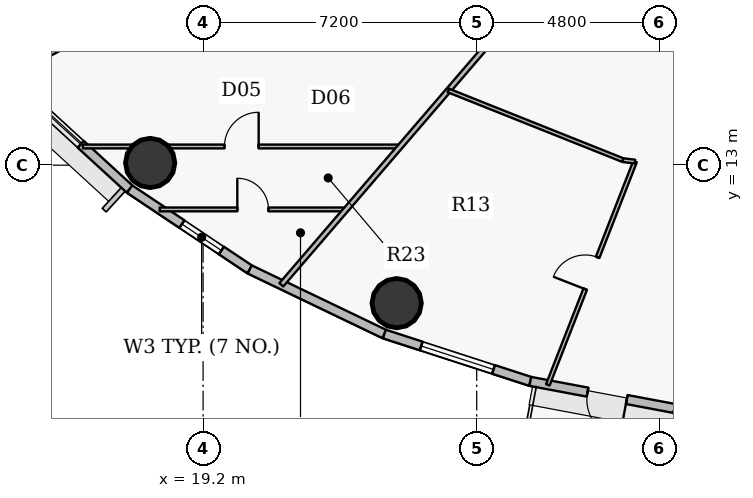
"""IFC4 building model, lengths in metres.
Left out: names, types, materials, properties, quantities, classifications, styles, units other than length and angle.
Written with IfcOpenShell. Run it as: python <this file> out.ifc"""

import sys

from ifc_helpers import new_model, si_unit, direction, frame, frame_2d, origin, origin_2d, place, context, subcontext, project, spatial, rectangle, hollow_circle, extrude, source, transform, mapped, element, fill, save


model = new_model("IFC4")
c1 = context("Model", 3, precision=1e-05, world=origin(), true_north=direction((0.0, 1.0)))
c2 = subcontext(c1, "Body", "Model", "MODEL_VIEW")
j1 = project(units=[si_unit("LENGTHUNIT", "METRE"), si_unit("PLANEANGLEUNIT", "RADIAN")], contexts=[c1])
p1 = place(None, origin())
s1 = spatial("IfcSite", under=j1, at=p1, CompositionType="ELEMENT")
p2 = place(p1, origin())
s2 = spatial("IfcBuilding", under=s1, at=p2, CompositionType="ELEMENT")
p3 = place(p2, frame((0.0, 0.0, 182.4)))
s3 = spatial("IfcBuildingStorey", under=s2, at=p3, CompositionType="ELEMENT", Elevation=182.4)
for number, where, z_axis, x_axis in (
    (1, (17.808, 13.058, 0.0), (0.0, 0.0, 1.0), (1.0, 0.0, 0.0)),
    (2, (24.294, 9.369, 0.0), (0.0, 0.0, 1.0), (1.0, 0.0, 0.0)),
):
    element("IfcColumn", number, at=place(p3, frame(where, z_axis=z_axis, x_axis=x_axis)), inside=s3, PredefinedType="COLUMN", context=c2, shape_type="SweptSolid", body=[
        extrude(hollow_circle(Radius=0.65, WallThickness=0.04, at=origin_2d()), origin(), (0.0, 0.0, 1.0), 3.75),
    ])
p4 = place(p3, frame((17.268, 12.369, 0.0), z_axis=(0.0, 0.0, 1.0), x_axis=(-0.737076565834, 0.675809245349, 0.0)))
e3 = element("IfcWall", 3, at=p4, inside=s3, PredefinedType="SOLIDWALL", context=c2, shape_type="SweptSolid", body=[
    extrude(rectangle(XDim=3.658, YDim=0.24, at=frame_2d((1.829, 0.0))), origin(), (0.0, 0.0, 1.0), 3.5),
])
p5 = place(p4, frame((1.746, 0.0, 0.9)))
e4 = element("IfcOpeningElement", 4, at=p5, cuts=e3, PredefinedType="OPENING", context=c2, shape_type="SweptSolid", body=[
    extrude(rectangle(XDim=1.25, YDim=1.65, at=origin_2d()), frame((0.625, 0.13, 0.825), z_axis=(0.0, -1.0, 0.0), x_axis=(1.0, 0.0, 0.0)), (0.0, 0.0, 1.0), 0.26),
])
p6 = place(p3, frame((20.427, 10.257, 0.0), z_axis=(0.0, 0.0, 1.0), x_axis=(-0.831228998277, 0.555930168657, 0.0)))
e5 = element("IfcWall", 5, at=p6, inside=s3, PredefinedType="SOLIDWALL", context=c2, shape_type="SweptSolid", body=[
    extrude(rectangle(XDim=3.8, YDim=0.24, at=frame_2d((1.9, 0.0))), origin(), (0.0, 0.0, 1.0), 3.5),
])
p7 = place(p6, frame((0.896, 0.0, 0.9)))
e6 = element("IfcOpeningElement", 6, at=p7, cuts=e5, PredefinedType="OPENING", context=c2, shape_type="SweptSolid", body=[
    extrude(rectangle(XDim=1.25, YDim=1.65, at=origin_2d()), frame((0.625, 0.13, 0.825), z_axis=(0.0, -1.0, 0.0), x_axis=(1.0, 0.0, 0.0)), (0.0, 0.0, 1.0), 0.26),
])
p8 = place(p3, frame((23.97, 8.556, 0.0), z_axis=(0.0, 0.0, 1.0), x_axis=(-0.901564733809, 0.432644231155, 0.0)))
e7 = element("IfcWall", 7, at=p8, inside=s3, PredefinedType="SOLIDWALL", context=c2, shape_type="SweptSolid", body=[
    extrude(rectangle(XDim=3.93, YDim=0.24, at=frame_2d((1.965, 0.0))), origin(), (0.0, 0.0, 1.0), 3.5),
])
p9 = place(p3, frame((27.811, 7.311, 0.0), z_axis=(0.0, 0.0, 1.0), x_axis=(-0.951209870236, 0.30854462038, 0.0)))
e8 = element("IfcWall", 8, at=p9, inside=s3, PredefinedType="SOLIDWALL", context=c2, shape_type="SweptSolid", body=[
    extrude(rectangle(XDim=4.038, YDim=0.24, at=frame_2d((2.019, 0.0))), origin(), (0.0, 0.0, 1.0), 3.5),
])
p10 = place(p9, frame((1.019, 0.0, 0.9)))
e9 = element("IfcOpeningElement", 9, at=p10, cuts=e8, PredefinedType="OPENING", context=c2, shape_type="SweptSolid", body=[
    extrude(rectangle(XDim=2.0, YDim=1.75, at=origin_2d()), frame((1.0, 0.13, 0.875), z_axis=(0.0, -1.0, 0.0), x_axis=(1.0, 0.0, 0.0)), (0.0, 0.0, 1.0), 0.26),
])
p11 = place(p3, frame((31.854, 6.551, 0.0), z_axis=(0.0, 0.0, 1.0), x_axis=(-0.982788108205, 0.184736391573, 0.0)))
e10 = element("IfcWall", 10, at=p11, inside=s3, PredefinedType="SOLIDWALL", context=c2, shape_type="SweptSolid", body=[
    extrude(rectangle(XDim=4.114, YDim=0.24, at=frame_2d((2.057, 0.0))), origin(), (0.0, 0.0, 1.0), 3.5),
])
p12 = place(p11, frame((1.532, 0.0, 0.0)))
e11 = element("IfcOpeningElement", 11, at=p12, cuts=e10, PredefinedType="OPENING", context=c2, shape_type="SweptSolid", body=[
    extrude(rectangle(XDim=1.05, YDim=2.15, at=origin_2d()), frame((0.525, 0.13, 1.075), z_axis=(0.0, -1.0, 0.0), x_axis=(1.0, 0.0, 0.0)), (0.0, 0.0, 1.0), 0.26),
])
p13 = place(p3, frame((14.145, 15.379, 0.0), z_axis=(0.0, 0.0, 1.0), x_axis=(0.882946160832, 0.469474256027, 0.0)))
e12 = element("IfcWall", 12, at=p13, inside=s3, PredefinedType="PARTITIONING", context=c2, shape_type="SweptSolid", body=[
    extrude(rectangle(XDim=7.385, YDim=0.1, at=frame_2d((3.692, 0.0))), origin(), (0.0, 0.0, 1.0), 2.935),
])
p14 = place(p13, frame((3.242, 0.0, 0.0)))
e13 = element("IfcOpeningElement", 13, at=p14, cuts=e12, PredefinedType="OPENING", context=c2, shape_type="SweptSolid", body=[
    extrude(rectangle(XDim=0.9, YDim=2.1, at=origin_2d()), frame((0.45, 0.06, 1.05), z_axis=(0.0, -1.0, 0.0), x_axis=(1.0, 0.0, 0.0)), (0.0, 0.0, 1.0), 0.12),
])
p15 = place(p3, frame((16.037, 13.491, 0.0), z_axis=(0.0, 0.0, 1.0), x_axis=(1.0, 0.0, 0.0)))
e14 = element("IfcWall", 14, at=p15, inside=s3, PredefinedType="PARTITIONING", context=c2, shape_type="SweptSolid", body=[
    extrude(rectangle(XDim=8.35, YDim=0.1, at=frame_2d((4.175, 0.0))), origin(), (0.0, 0.0, 1.0), 2.935),
])
p16 = place(p15, frame((3.725, 0.0, 0.0)))
e15 = element("IfcOpeningElement", 15, at=p16, cuts=e14, PredefinedType="OPENING", context=c2, shape_type="SweptSolid", body=[
    extrude(rectangle(XDim=0.9, YDim=2.1, at=origin_2d()), frame((0.45, 0.06, 1.05), z_axis=(0.0, -1.0, 0.0), x_axis=(1.0, 0.0, 0.0)), (0.0, 0.0, 1.0), 0.12),
])
p17 = place(p3, frame((18.057, 11.836, 0.0), z_axis=(0.0, 0.0, 1.0), x_axis=(1.0, 0.0, 0.0)))
e16 = element("IfcWall", 16, at=p17, inside=s3, PredefinedType="PARTITIONING", context=c2, shape_type="SweptSolid", body=[
    extrude(rectangle(XDim=4.907, YDim=0.1, at=frame_2d((2.453, 0.0))), origin(), (0.0, 0.0, 1.0), 2.935),
])
p18 = place(p17, frame((2.043, 0.0, 0.0)))
e17 = element("IfcOpeningElement", 17, at=p18, cuts=e16, PredefinedType="OPENING", context=c2, shape_type="SweptSolid", body=[
    extrude(rectangle(XDim=0.82, YDim=2.1, at=origin_2d()), frame((0.41, 0.06, 1.05), z_axis=(0.0, -1.0, 0.0), x_axis=(1.0, 0.0, 0.0)), (0.0, 0.0, 1.0), 0.12),
])
p19 = place(p3, frame((21.259, 9.852, 0.0), z_axis=(0.0, 0.0, 1.0), x_axis=(0.651889454341, 0.758314011026, 0.0)))
e18 = element("IfcWall", 18, at=p19, inside=s3, PredefinedType="PARTITIONING", context=c2, shape_type="SweptSolid", body=[
    extrude(rectangle(XDim=10.942, YDim=0.135, at=frame_2d((5.471, 0.0))), origin(), (0.0, 0.0, 1.0), 2.935),
])
p20 = place(p3, frame((25.654, 14.965, 0.0), z_axis=(0.0, 0.0, 1.0), x_axis=(0.928793067963, -0.370598754589, 0.0)))
e19 = element("IfcWall", 19, at=p20, inside=s3, PredefinedType="PARTITIONING", context=c2, shape_type="SweptSolid", body=[
    extrude(rectangle(XDim=4.944, YDim=0.1, at=frame_2d((2.472, 0.0))), origin(), (0.0, 0.0, 1.0), 2.935),
])
p21 = place(p3, frame((28.271, 7.219, 0.0), z_axis=(0.0, 0.0, 1.0), x_axis=(0.363936593544, 0.931423725207, 0.0)))
e20 = element("IfcWall", 20, at=p21, inside=s3, PredefinedType="PARTITIONING", context=c2, shape_type="SweptSolid", body=[
    extrude(rectangle(XDim=6.306, YDim=0.1, at=frame_2d((3.153, 0.0))), origin(), (0.0, 0.0, 1.0), 2.935),
])
p22 = place(p21, frame((2.703, 0.0, 0.0)))
e21 = element("IfcOpeningElement", 21, at=p22, cuts=e20, PredefinedType="OPENING", context=c2, shape_type="SweptSolid", body=[
    extrude(rectangle(XDim=0.9, YDim=2.1, at=origin_2d()), frame((0.45, 0.06, 1.05), z_axis=(0.0, -1.0, 0.0), x_axis=(1.0, 0.0, 0.0)), (0.0, 0.0, 1.0), 0.12),
])
p23 = place(p3, frame((30.246, 13.133, 0.0), z_axis=(0.0, 0.0, 1.0), x_axis=(0.992451589144, -0.122637038475, 0.0)))
e22 = element("IfcWall", 22, at=p23, inside=s3, PredefinedType="PARTITIONING", context=c2, shape_type="SweptSolid", body=[
    extrude(rectangle(XDim=0.323, YDim=0.1, at=frame_2d((0.161, 0.0))), origin(), (0.0, 0.0, 1.0), 3.5),
])
m1 = source(origin(), c2, "Body", "SweptSolid", [
    extrude(rectangle(XDim=1.25, YDim=1.65, at=origin_2d()), frame((0.625, 0.03, 0.825), z_axis=(0.0, -1.0, 0.0), x_axis=(1.0, 0.0, 0.0)), (0.0, 0.0, 1.0), 0.06),
])
p24 = place(p7, origin())
e23 = element("IfcWindow", 23, at=p24, inside=s3, PartitioningType="SINGLE_PANEL", PredefinedType="WINDOW", context=c2, shape_type="MappedRepresentation", body=[
    mapped(m1, transform((0.0, 0.0, 0.0), x_axis=(1.0, 0.0, 0.0), y_axis=(0.0, 1.0, 0.0), z_axis=(0.0, 0.0, 1.0), scale=1.0)),
])
fill(e6, e23)
m2 = source(origin(), c2, "Body", "SweptSolid", [
    extrude(rectangle(XDim=2.0, YDim=1.75, at=origin_2d()), frame((1.0, 0.03, 0.875), z_axis=(0.0, -1.0, 0.0), x_axis=(1.0, 0.0, 0.0)), (0.0, 0.0, 1.0), 0.06),
])
p25 = place(p10, origin())
e24 = element("IfcWindow", 24, at=p25, inside=s3, PartitioningType="DOUBLE_PANEL_VERTICAL", PredefinedType="WINDOW", context=c2, shape_type="MappedRepresentation", body=[
    mapped(m2, transform((0.0, 0.0, 0.0), x_axis=(1.0, 0.0, 0.0), y_axis=(0.0, 1.0, 0.0), z_axis=(0.0, 0.0, 1.0), scale=1.0)),
])
fill(e9, e24)
m3 = source(origin(), c2, "Body", "SweptSolid", [
    extrude(rectangle(XDim=1.05, YDim=2.15, at=origin_2d()), frame((0.525, 0.025, 1.075), z_axis=(0.0, -1.0, 0.0), x_axis=(1.0, 0.0, 0.0)), (0.0, 0.0, 1.0), 0.05),
])
p26 = place(p12, origin())
e25 = element("IfcDoor", 25, at=p26, inside=s3, OperationType="SINGLE_SWING_LEFT", PredefinedType="DOOR", context=c2, shape_type="MappedRepresentation", body=[
    mapped(m3, transform((0.0, 0.0, 0.0), x_axis=(1.0, 0.0, 0.0), y_axis=(0.0, 1.0, 0.0), z_axis=(0.0, 0.0, 1.0), scale=1.0)),
])
fill(e11, e25)
p27 = place(p5, origin())
e26 = element("IfcWindow", 26, at=p27, inside=s3, PartitioningType="SINGLE_PANEL", PredefinedType="WINDOW", context=c2, shape_type="MappedRepresentation", body=[
    mapped(m1, transform((0.0, 0.0, 0.0), x_axis=(1.0, 0.0, 0.0), y_axis=(0.0, 1.0, 0.0), z_axis=(0.0, 0.0, 1.0), scale=1.0)),
])
fill(e4, e26)
m4 = source(origin(), c2, "Body", "SweptSolid", [
    extrude(rectangle(XDim=0.9, YDim=2.1, at=origin_2d()), frame((0.45, 0.025, 1.05), z_axis=(0.0, -1.0, 0.0), x_axis=(1.0, 0.0, 0.0)), (0.0, 0.0, 1.0), 0.05),
])
p28 = place(p16, origin())
e27 = element("IfcDoor", 27, at=p28, inside=s3, OperationType="SINGLE_SWING_RIGHT", PredefinedType="DOOR", context=c2, shape_type="MappedRepresentation", body=[
    mapped(m4, transform((0.0, 0.0, 0.0), x_axis=(1.0, 0.0, 0.0), y_axis=(0.0, 1.0, 0.0), z_axis=(0.0, 0.0, 1.0), scale=1.0)),
])
fill(e15, e27)
m5 = source(origin(), c2, "Body", "SweptSolid", [
    extrude(rectangle(XDim=0.82, YDim=2.1, at=origin_2d()), frame((0.41, 0.025, 1.05), z_axis=(0.0, -1.0, 0.0), x_axis=(1.0, 0.0, 0.0)), (0.0, 0.0, 1.0), 0.05),
])
p29 = place(p18, origin())
e28 = element("IfcDoor", 28, at=p29, inside=s3, OperationType="SINGLE_SWING_LEFT", PredefinedType="DOOR", context=c2, shape_type="MappedRepresentation", body=[
    mapped(m5, transform((0.0, 0.0, 0.0), x_axis=(1.0, 0.0, 0.0), y_axis=(0.0, 1.0, 0.0), z_axis=(0.0, 0.0, 1.0), scale=1.0)),
])
fill(e17, e28)
p30 = place(p22, origin())
e29 = element("IfcDoor", 29, at=p30, inside=s3, OperationType="SINGLE_SWING_LEFT", PredefinedType="DOOR", context=c2, shape_type="MappedRepresentation", body=[
    mapped(m4, transform((0.0, 0.0, 0.0), x_axis=(1.0, 0.0, 0.0), y_axis=(0.0, 1.0, 0.0), z_axis=(0.0, 0.0, 1.0), scale=1.0)),
])
fill(e21, e29)
save(model, sys.argv[1])
